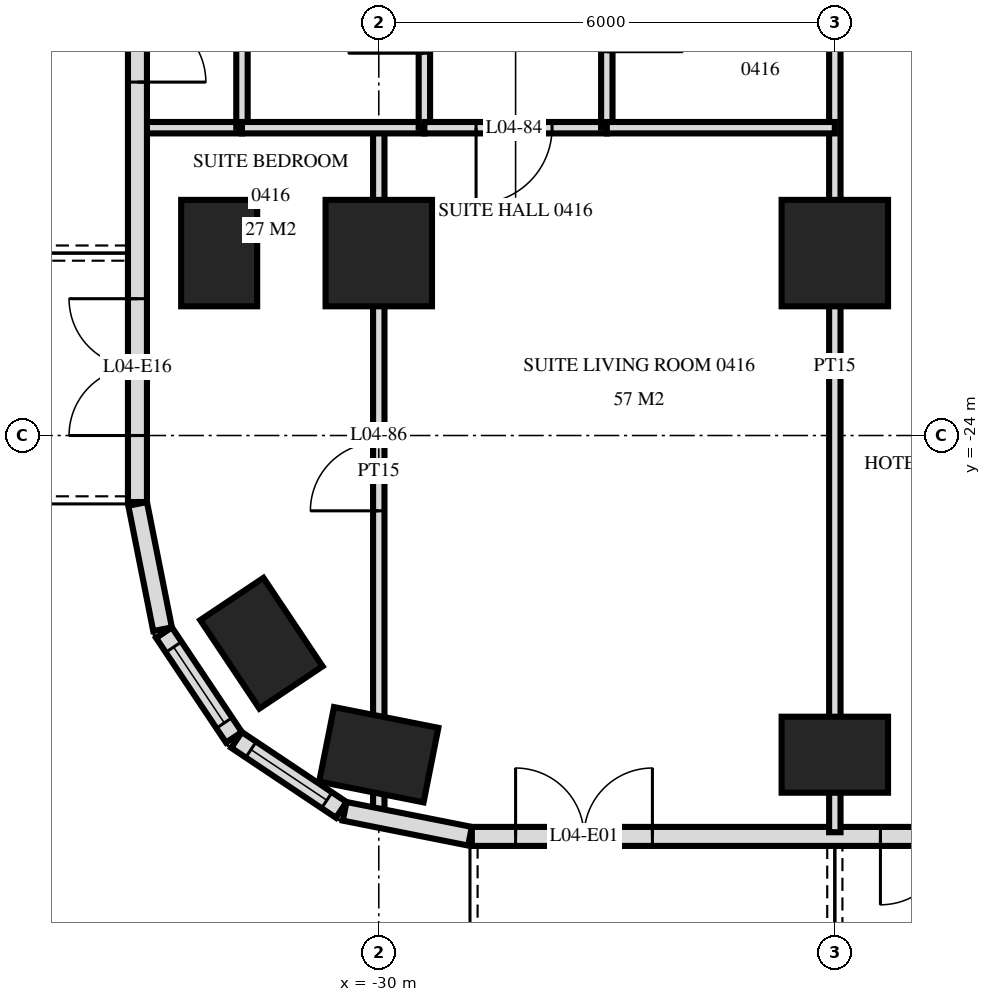
"""IFC4 building model, lengths in metres.
Left out: names, types, materials, properties, quantities, classifications, styles, units other than length and angle.
Written with IfcOpenShell. Run it as: python <this file> out.ifc"""

import sys

from ifc_helpers import new_model, si_unit, direction, frame, frame_2d, origin, origin_2d, place, context, subcontext, project, spatial, rectangle, extrude, element, fill, save


model = new_model("IFC4")
c1 = context("Model", 3, precision=1e-05, world=origin(), true_north=direction((0.0, 1.0)))
c2 = subcontext(c1, "Body", "Model", "MODEL_VIEW")
j1 = project(units=[si_unit("LENGTHUNIT", "METRE"), si_unit("PLANEANGLEUNIT", "RADIAN")], contexts=[c1])
p1 = place(None, origin())
s1 = spatial("IfcSite", under=j1, at=p1, CompositionType="ELEMENT")
p2 = place(p1, origin())
s2 = spatial("IfcBuilding", under=s1, at=p2, CompositionType="ELEMENT")
p3 = place(p2, frame((0.0, 0.0, 24.0)))
s3 = spatial("IfcBuildingStorey", under=s2, at=p3, CompositionType="ELEMENT", Elevation=24.0)
for number, where, z_axis, x_axis in (
    (1, (-32.1, -21.6, -0.28), (0.0, 0.0, 1.0), (0.0, 1.0, 0.0)),
    (2, (-31.544, -26.733, -0.28), (0.0, 0.0, 1.0), (-0.556, 0.831, 0.0)),
    (3, (-30.0, -28.2, -0.28), (0.0, 0.0, 1.0), (-0.981, 0.195, 0.0)),
):
    element("IfcColumn", number, at=place(p3, frame(where, z_axis=z_axis, x_axis=x_axis)), inside=s3, PredefinedType="COLUMN", context=c2, shape_type="SweptSolid", body=[
        extrude(rectangle(XDim=1.4, YDim=1.0, at=origin_2d()), origin(), (0.0, 0.0, 1.0), 3.88),
    ])
p4 = place(p3, frame((-30.0, -21.6, -0.28), z_axis=(0.0, 0.0, 1.0), x_axis=(1.0, 0.0, 0.0)))
e4 = element("IfcColumn", 4, at=p4, inside=s3, PredefinedType="COLUMN", context=c2, shape_type="SweptSolid", body=[
    extrude(rectangle(XDim=1.4, YDim=1.4, at=origin_2d()), origin(), (0.0, 0.0, 1.0), 3.88),
])
p5 = place(p3, frame((-24.0, -28.2, -0.28), z_axis=(0.0, 0.0, 1.0), x_axis=(1.0, 0.0, 0.0)))
e5 = element("IfcColumn", 5, at=p5, inside=s3, PredefinedType="COLUMN", context=c2, shape_type="SweptSolid", body=[
    extrude(rectangle(XDim=1.4, YDim=1.0, at=origin_2d()), origin(), (0.0, 0.0, 1.0), 3.88),
])
p6 = place(p3, frame((-24.0, -21.6, -0.28), z_axis=(0.0, 0.0, 1.0), x_axis=(1.0, 0.0, 0.0)))
e6 = element("IfcColumn", 6, at=p6, inside=s3, PredefinedType="COLUMN", context=c2, shape_type="SweptSolid", body=[
    extrude(rectangle(XDim=1.4, YDim=1.4, at=origin_2d()), origin(), (0.0, 0.0, 1.0), 3.88),
])
p7 = place(p3, frame((-33.175, -3.325, 0.0), z_axis=(0.0, 0.0, 1.0), x_axis=(0.0, -1.0, 0.0)))
e7 = element("IfcWall", 7, at=p7, inside=s3, PredefinedType="SOLIDWALL", context=c2, shape_type="SweptSolid", body=[
    extrude(rectangle(XDim=21.551, YDim=0.25, at=frame_2d((10.775, 0.0))), origin(), (0.0, 0.0, 1.0), 3.32),
])
p8 = place(p7, frame((7.025, 0.0, 0.0)))
e8 = element("IfcOpeningElement", 8, at=p8, cuts=e7, PredefinedType="OPENING", context=c2, shape_type="SweptSolid", body=[
    extrude(rectangle(XDim=1.8, YDim=2.4, at=frame_2d((0.9, 1.2))), frame((0.0, 0.135, 0.0), z_axis=(0.0, -1.0, 0.0), x_axis=(1.0, 0.0, 0.0)), (0.0, 0.0, 1.0), 0.27),
])
p9 = place(p7, frame((14.225, 0.0, 0.0)))
e9 = element("IfcOpeningElement", 9, at=p9, cuts=e7, PredefinedType="OPENING", context=c2, shape_type="SweptSolid", body=[
    extrude(rectangle(XDim=1.8, YDim=2.4, at=frame_2d((0.9, 1.2))), frame((0.0, 0.135, 0.0), z_axis=(0.0, -1.0, 0.0), x_axis=(1.0, 0.0, 0.0)), (0.0, 0.0, 1.0), 0.27),
])
p10 = place(p7, frame((18.875, 0.0, 0.0)))
e10 = element("IfcOpeningElement", 10, at=p10, cuts=e7, PredefinedType="OPENING", context=c2, shape_type="SweptSolid", body=[
    extrude(rectangle(XDim=1.8, YDim=2.4, at=frame_2d((0.9, 1.2))), frame((0.0, 0.135, 0.0), z_axis=(0.0, -1.0, 0.0), x_axis=(1.0, 0.0, 0.0)), (0.0, 0.0, 1.0), 0.27),
])
p11 = place(p3, frame((-33.173, -24.9, 0.0), z_axis=(0.0, 0.0, 1.0), x_axis=(0.195166572128, -0.980770110232, 0.0)))
e11 = element("IfcWall", 11, at=p11, inside=s3, PredefinedType="SOLIDWALL", context=c2, shape_type="SweptSolid", body=[
    extrude(rectangle(XDim=1.681, YDim=0.25, at=frame_2d((0.841, 0.0))), origin(), (0.0, 0.0, 1.0), 3.32),
])
p12 = place(p3, frame((-32.826, -26.594, 0.0), z_axis=(0.0, 0.0, 1.0), x_axis=(0.55555029066, -0.831482937015, 0.0)))
e12 = element("IfcWall", 12, at=p12, inside=s3, PredefinedType="SOLIDWALL", context=c2, shape_type="SweptSolid", body=[
    extrude(rectangle(XDim=1.656, YDim=0.25, at=frame_2d((0.828, 0.0))), origin(), (0.0, 0.0, 1.0), 3.32),
])
p13 = place(p12, frame((0.228, 0.0, 0.9)))
e13 = element("IfcOpeningElement", 13, at=p13, cuts=e12, PredefinedType="OPENING", context=c2, shape_type="SweptSolid", body=[
    extrude(rectangle(XDim=1.2, YDim=1.5, at=frame_2d((0.6, 0.75))), frame((0.0, 0.135, 0.0), z_axis=(0.0, -1.0, 0.0), x_axis=(1.0, 0.0, 0.0)), (0.0, 0.0, 1.0), 0.27),
])
p14 = place(p3, frame((-31.871, -28.006, 0.0), z_axis=(0.0, 0.0, 1.0), x_axis=(0.831482937015, -0.55555029066, 0.0)))
e14 = element("IfcWall", 14, at=p14, inside=s3, PredefinedType="SOLIDWALL", context=c2, shape_type="SweptSolid", body=[
    extrude(rectangle(XDim=1.656, YDim=0.25, at=frame_2d((0.828, 0.0))), origin(), (0.0, 0.0, 1.0), 3.32),
])
p15 = place(p14, frame((0.228, 0.0, 0.9)))
e15 = element("IfcOpeningElement", 15, at=p15, cuts=e14, PredefinedType="OPENING", context=c2, shape_type="SweptSolid", body=[
    extrude(rectangle(XDim=1.2, YDim=1.5, at=frame_2d((0.6, 0.75))), frame((0.0, 0.135, 0.0), z_axis=(0.0, -1.0, 0.0), x_axis=(1.0, 0.0, 0.0)), (0.0, 0.0, 1.0), 0.27),
])
p16 = place(p3, frame((-30.449, -28.945, 0.0), z_axis=(0.0, 0.0, 1.0), x_axis=(0.980775640221, -0.19513878023, 0.0)))
e16 = element("IfcWall", 16, at=p16, inside=s3, PredefinedType="SOLIDWALL", context=c2, shape_type="SweptSolid", body=[
    extrude(rectangle(XDim=1.681, YDim=0.25, at=frame_2d((0.841, 0.0))), origin(), (0.0, 0.0, 1.0), 3.32),
])
p17 = place(p3, frame((-28.775, -29.275, 0.0), z_axis=(0.0, 0.0, 1.0), x_axis=(1.0, 0.0, 0.0)))
e17 = element("IfcWall", 17, at=p17, inside=s3, PredefinedType="SOLIDWALL", context=c2, shape_type="SweptSolid", body=[
    extrude(rectangle(XDim=57.551, YDim=0.25, at=frame_2d((28.775, 0.0))), origin(), (0.0, 0.0, 1.0), 3.32),
])
p18 = place(p17, frame((0.575, 0.0, 0.0)))
e18 = element("IfcOpeningElement", 18, at=p18, cuts=e17, PredefinedType="OPENING", context=c2, shape_type="SweptSolid", body=[
    extrude(rectangle(XDim=1.8, YDim=2.4, at=frame_2d((0.9, 1.2))), frame((0.0, 0.135, 0.0), z_axis=(0.0, -1.0, 0.0), x_axis=(1.0, 0.0, 0.0)), (0.0, 0.0, 1.0), 0.27),
])
p19 = place(p17, frame((5.375, 0.0, 0.0)))
e19 = element("IfcOpeningElement", 19, at=p19, cuts=e17, PredefinedType="OPENING", context=c2, shape_type="SweptSolid", body=[
    extrude(rectangle(XDim=1.8, YDim=2.4, at=frame_2d((0.9, 1.2))), frame((0.0, 0.135, 0.0), z_axis=(0.0, -1.0, 0.0), x_axis=(1.0, 0.0, 0.0)), (0.0, 0.0, 1.0), 0.27),
])
p20 = place(p17, frame((8.075, 0.0, 0.3)))
e20 = element("IfcOpeningElement", 20, at=p20, cuts=e17, PredefinedType="OPENING", context=c2, shape_type="SweptSolid", body=[
    extrude(rectangle(XDim=2.4, YDim=2.1, at=frame_2d((1.2, 1.05))), frame((0.0, 0.135, 0.0), z_axis=(0.0, -1.0, 0.0), x_axis=(1.0, 0.0, 0.0)), (0.0, 0.0, 1.0), 0.27),
])
p21 = place(p17, frame((11.375, 0.0, 0.0)))
e21 = element("IfcOpeningElement", 21, at=p21, cuts=e17, PredefinedType="OPENING", context=c2, shape_type="SweptSolid", body=[
    extrude(rectangle(XDim=1.8, YDim=2.4, at=frame_2d((0.9, 1.2))), frame((0.0, 0.135, 0.0), z_axis=(0.0, -1.0, 0.0), x_axis=(1.0, 0.0, 0.0)), (0.0, 0.0, 1.0), 0.27),
])
p22 = place(p17, frame((14.075, 0.0, 0.3)))
e22 = element("IfcOpeningElement", 22, at=p22, cuts=e17, PredefinedType="OPENING", context=c2, shape_type="SweptSolid", body=[
    extrude(rectangle(XDim=2.4, YDim=2.1, at=frame_2d((1.2, 1.05))), frame((0.0, 0.135, 0.0), z_axis=(0.0, -1.0, 0.0), x_axis=(1.0, 0.0, 0.0)), (0.0, 0.0, 1.0), 0.27),
])
p23 = place(p17, frame((17.375, 0.0, 0.0)))
e23 = element("IfcOpeningElement", 23, at=p23, cuts=e17, PredefinedType="OPENING", context=c2, shape_type="SweptSolid", body=[
    extrude(rectangle(XDim=1.8, YDim=2.4, at=frame_2d((0.9, 1.2))), frame((0.0, 0.135, 0.0), z_axis=(0.0, -1.0, 0.0), x_axis=(1.0, 0.0, 0.0)), (0.0, 0.0, 1.0), 0.27),
])
p24 = place(p17, frame((20.075, 0.0, 0.3)))
e24 = element("IfcOpeningElement", 24, at=p24, cuts=e17, PredefinedType="OPENING", context=c2, shape_type="SweptSolid", body=[
    extrude(rectangle(XDim=2.4, YDim=2.1, at=frame_2d((1.2, 1.05))), frame((0.0, 0.135, 0.0), z_axis=(0.0, -1.0, 0.0), x_axis=(1.0, 0.0, 0.0)), (0.0, 0.0, 1.0), 0.27),
])
p25 = place(p17, frame((23.075, 0.0, 0.3)))
e25 = element("IfcOpeningElement", 25, at=p25, cuts=e17, PredefinedType="OPENING", context=c2, shape_type="SweptSolid", body=[
    extrude(rectangle(XDim=2.4, YDim=2.1, at=frame_2d((1.2, 1.05))), frame((0.0, 0.135, 0.0), z_axis=(0.0, -1.0, 0.0), x_axis=(1.0, 0.0, 0.0)), (0.0, 0.0, 1.0), 0.27),
])
p26 = place(p17, frame((26.375, 0.0, 0.0)))
e26 = element("IfcOpeningElement", 26, at=p26, cuts=e17, PredefinedType="OPENING", context=c2, shape_type="SweptSolid", body=[
    extrude(rectangle(XDim=1.8, YDim=2.4, at=frame_2d((0.9, 1.2))), frame((0.0, 0.135, 0.0), z_axis=(0.0, -1.0, 0.0), x_axis=(1.0, 0.0, 0.0)), (0.0, 0.0, 1.0), 0.27),
])
p27 = place(p17, frame((29.375, 0.0, 0.0)))
e27 = element("IfcOpeningElement", 27, at=p27, cuts=e17, PredefinedType="OPENING", context=c2, shape_type="SweptSolid", body=[
    extrude(rectangle(XDim=1.8, YDim=2.4, at=frame_2d((0.9, 1.2))), frame((0.0, 0.135, 0.0), z_axis=(0.0, -1.0, 0.0), x_axis=(1.0, 0.0, 0.0)), (0.0, 0.0, 1.0), 0.27),
])
p28 = place(p17, frame((32.075, 0.0, 0.3)))
e28 = element("IfcOpeningElement", 28, at=p28, cuts=e17, PredefinedType="OPENING", context=c2, shape_type="SweptSolid", body=[
    extrude(rectangle(XDim=2.4, YDim=2.1, at=frame_2d((1.2, 1.05))), frame((0.0, 0.135, 0.0), z_axis=(0.0, -1.0, 0.0), x_axis=(1.0, 0.0, 0.0)), (0.0, 0.0, 1.0), 0.27),
])
p29 = place(p17, frame((35.375, 0.0, 0.0)))
e29 = element("IfcOpeningElement", 29, at=p29, cuts=e17, PredefinedType="OPENING", context=c2, shape_type="SweptSolid", body=[
    extrude(rectangle(XDim=1.8, YDim=2.4, at=frame_2d((0.9, 1.2))), frame((0.0, 0.135, 0.0), z_axis=(0.0, -1.0, 0.0), x_axis=(1.0, 0.0, 0.0)), (0.0, 0.0, 1.0), 0.27),
])
p30 = place(p17, frame((38.075, 0.0, 0.3)))
e30 = element("IfcOpeningElement", 30, at=p30, cuts=e17, PredefinedType="OPENING", context=c2, shape_type="SweptSolid", body=[
    extrude(rectangle(XDim=2.4, YDim=2.1, at=frame_2d((1.2, 1.05))), frame((0.0, 0.135, 0.0), z_axis=(0.0, -1.0, 0.0), x_axis=(1.0, 0.0, 0.0)), (0.0, 0.0, 1.0), 0.27),
])
p31 = place(p17, frame((41.375, 0.0, 0.0)))
e31 = element("IfcOpeningElement", 31, at=p31, cuts=e17, PredefinedType="OPENING", context=c2, shape_type="SweptSolid", body=[
    extrude(rectangle(XDim=1.8, YDim=2.4, at=frame_2d((0.9, 1.2))), frame((0.0, 0.135, 0.0), z_axis=(0.0, -1.0, 0.0), x_axis=(1.0, 0.0, 0.0)), (0.0, 0.0, 1.0), 0.27),
])
p32 = place(p17, frame((44.075, 0.0, 0.3)))
e32 = element("IfcOpeningElement", 32, at=p32, cuts=e17, PredefinedType="OPENING", context=c2, shape_type="SweptSolid", body=[
    extrude(rectangle(XDim=2.4, YDim=2.1, at=frame_2d((1.2, 1.05))), frame((0.0, 0.135, 0.0), z_axis=(0.0, -1.0, 0.0), x_axis=(1.0, 0.0, 0.0)), (0.0, 0.0, 1.0), 0.27),
])
p33 = place(p17, frame((47.075, 0.0, 0.3)))
e33 = element("IfcOpeningElement", 33, at=p33, cuts=e17, PredefinedType="OPENING", context=c2, shape_type="SweptSolid", body=[
    extrude(rectangle(XDim=2.4, YDim=2.1, at=frame_2d((1.2, 1.05))), frame((0.0, 0.135, 0.0), z_axis=(0.0, -1.0, 0.0), x_axis=(1.0, 0.0, 0.0)), (0.0, 0.0, 1.0), 0.27),
])
p34 = place(p17, frame((50.375, 0.0, 0.0)))
e34 = element("IfcOpeningElement", 34, at=p34, cuts=e17, PredefinedType="OPENING", context=c2, shape_type="SweptSolid", body=[
    extrude(rectangle(XDim=1.8, YDim=2.4, at=frame_2d((0.9, 1.2))), frame((0.0, 0.135, 0.0), z_axis=(0.0, -1.0, 0.0), x_axis=(1.0, 0.0, 0.0)), (0.0, 0.0, 1.0), 0.27),
])
p35 = place(p17, frame((53.375, 0.0, 0.0)))
e35 = element("IfcOpeningElement", 35, at=p35, cuts=e17, PredefinedType="OPENING", context=c2, shape_type="SweptSolid", body=[
    extrude(rectangle(XDim=1.8, YDim=2.4, at=frame_2d((0.9, 1.2))), frame((0.0, 0.135, 0.0), z_axis=(0.0, -1.0, 0.0), x_axis=(1.0, 0.0, 0.0)), (0.0, 0.0, 1.0), 0.27),
])
p36 = place(p3, frame((-24.0, -29.22, 0.0), z_axis=(0.0, 0.0, 1.0), x_axis=(0.0, 1.0, 0.0)))
e36 = element("IfcWall", 36, at=p36, inside=s3, PredefinedType="PARTITIONING", context=c2, shape_type="SweptSolid", body=[
    extrude(rectangle(XDim=12.27, YDim=0.15, at=frame_2d((6.135, 0.0))), origin(), (0.0, 0.0, 1.0), 3.32),
])
p37 = place(p3, frame((-27.0, -19.95, 0.0), z_axis=(0.0, 0.0, 1.0), x_axis=(0.0, 1.0, 0.0)))
e37 = element("IfcWall", 37, at=p37, inside=s3, PredefinedType="PARTITIONING", context=c2, shape_type="SweptSolid", body=[
    extrude(rectangle(XDim=3.0, YDim=0.15, at=frame_2d((1.5, 0.0))), origin(), (0.0, 0.0, 1.0), 3.32),
])
p38 = place(p37, frame((1.0, 0.0, 0.0)))
e38 = element("IfcOpeningElement", 38, at=p38, cuts=e37, PredefinedType="OPENING", context=c2, shape_type="SweptSolid", body=[
    extrude(rectangle(XDim=1.0, YDim=2.1, at=frame_2d((0.5, 1.05))), frame((0.0, 0.085, 0.0), z_axis=(0.0, -1.0, 0.0), x_axis=(1.0, 0.0, 0.0)), (0.0, 0.0, 1.0), 0.17),
])
p39 = place(p3, frame((-29.4, -19.95, 0.0), z_axis=(0.0, 0.0, 1.0), x_axis=(0.0, 1.0, 0.0)))
e39 = element("IfcWall", 39, at=p39, inside=s3, PredefinedType="PARTITIONING", context=c2, shape_type="SweptSolid", body=[
    extrude(rectangle(XDim=3.0, YDim=0.15, at=frame_2d((1.5, 0.0))), origin(), (0.0, 0.0, 1.0), 3.32),
])
p40 = place(p39, frame((0.98, 0.0, 0.0)))
e40 = element("IfcOpeningElement", 40, at=p40, cuts=e39, PredefinedType="OPENING", context=c2, shape_type="SweptSolid", body=[
    extrude(rectangle(XDim=1.0, YDim=2.1, at=frame_2d((0.5, 1.05))), frame((0.0, 0.085, 0.0), z_axis=(0.0, -1.0, 0.0), x_axis=(1.0, 0.0, 0.0)), (0.0, 0.0, 1.0), 0.17),
])
p41 = place(p3, frame((-30.0, -28.978, 0.0), z_axis=(0.0, 0.0, 1.0), x_axis=(0.0, 1.0, 0.0)))
e41 = element("IfcWall", 41, at=p41, inside=s3, PredefinedType="PARTITIONING", context=c2, shape_type="SweptSolid", body=[
    extrude(rectangle(XDim=9.028, YDim=0.15, at=frame_2d((4.514, 0.0))), origin(), (0.0, 0.0, 1.0), 3.32),
])
p42 = place(p41, frame((3.987, 0.0, 0.0)))
e42 = element("IfcOpeningElement", 42, at=p42, cuts=e41, PredefinedType="OPENING", context=c2, shape_type="SweptSolid", body=[
    extrude(rectangle(XDim=0.9, YDim=2.1, at=frame_2d((0.45, 1.05))), frame((0.0, 0.085, 0.0), z_axis=(0.0, -1.0, 0.0), x_axis=(1.0, 0.0, 0.0)), (0.0, 0.0, 1.0), 0.17),
])
p43 = place(p3, frame((-31.8, -19.95, 0.0), z_axis=(0.0, 0.0, 1.0), x_axis=(0.0, 1.0, 0.0)))
e43 = element("IfcWall", 43, at=p43, inside=s3, PredefinedType="PLUMBINGWALL", context=c2, shape_type="SweptSolid", body=[
    extrude(rectangle(XDim=3.0, YDim=0.15, at=frame_2d((1.5, 0.0))), origin(), (0.0, 0.0, 1.0), 3.32),
])
p44 = place(p43, frame((1.08, 0.0, 0.0)))
e44 = element("IfcOpeningElement", 44, at=p44, cuts=e43, PredefinedType="OPENING", context=c2, shape_type="SweptSolid", body=[
    extrude(rectangle(XDim=0.8, YDim=2.1, at=frame_2d((0.4, 1.05))), frame((0.0, 0.085, 0.0), z_axis=(0.0, -1.0, 0.0), x_axis=(1.0, 0.0, 0.0)), (0.0, 0.0, 1.0), 0.17),
])
p45 = place(p3, frame((-29.4, -19.95, 0.0), z_axis=(0.0, 0.0, 1.0), x_axis=(1.0, 0.0, 0.0)))
e45 = element("IfcWall", 45, at=p45, inside=s3, PredefinedType="PARTITIONING", context=c2, shape_type="SweptSolid", body=[
    extrude(rectangle(XDim=2.4, YDim=0.15, at=frame_2d((1.2, 0.0))), origin(), (0.0, 0.0, 1.0), 3.32),
])
p46 = place(p45, frame((0.68, 0.0, 0.0)))
e46 = element("IfcOpeningElement", 46, at=p46, cuts=e45, PredefinedType="OPENING", context=c2, shape_type="SweptSolid", body=[
    extrude(rectangle(XDim=1.0, YDim=2.1, at=frame_2d((0.5, 1.05))), frame((0.0, 0.085, 0.0), z_axis=(0.0, -1.0, 0.0), x_axis=(1.0, 0.0, 0.0)), (0.0, 0.0, 1.0), 0.17),
])
p47 = place(p3, frame((-31.8, -19.95, 0.0), z_axis=(0.0, 0.0, 1.0), x_axis=(1.0, 0.0, 0.0)))
e47 = element("IfcWall", 47, at=p47, inside=s3, PredefinedType="PARTITIONING", context=c2, shape_type="SweptSolid", body=[
    extrude(rectangle(XDim=2.4, YDim=0.15, at=frame_2d((1.2, 0.0))), origin(), (0.0, 0.0, 1.0), 3.32),
])
p48 = place(p3, frame((-27.0, -19.95, 0.0), z_axis=(0.0, 0.0, 1.0), x_axis=(1.0, 0.0, 0.0)))
e48 = element("IfcWall", 48, at=p48, inside=s3, PredefinedType="PARTITIONING", context=c2, shape_type="SweptSolid", body=[
    extrude(rectangle(XDim=3.0, YDim=0.15, at=frame_2d((1.5, 0.0))), origin(), (0.0, 0.0, 1.0), 3.32),
])
p49 = place(p3, frame((-33.12, -19.95, 0.0), z_axis=(0.0, 0.0, 1.0), x_axis=(1.0, 0.0, 0.0)))
e49 = element("IfcWall", 49, at=p49, inside=s3, PredefinedType="PLUMBINGWALL", context=c2, shape_type="SweptSolid", body=[
    extrude(rectangle(XDim=1.32, YDim=0.15, at=frame_2d((0.66, 0.0))), origin(), (0.0, 0.0, 1.0), 3.32),
])
p50 = place(p13, origin())
e50 = element("IfcWindow", 50, at=p50, inside=s3, PartitioningType="SINGLE_PANEL", PredefinedType="WINDOW", context=c2, shape_type="SweptSolid", body=[
    extrude(rectangle(XDim=1.2, YDim=1.5, at=frame_2d((0.6, 0.75))), frame((0.0, 0.03, 0.0), z_axis=(0.0, -1.0, 0.0), x_axis=(1.0, 0.0, 0.0)), (0.0, 0.0, 1.0), 0.06),
])
fill(e13, e50)
p51 = place(p15, origin())
e51 = element("IfcWindow", 51, at=p51, inside=s3, PartitioningType="SINGLE_PANEL", PredefinedType="WINDOW", context=c2, shape_type="SweptSolid", body=[
    extrude(rectangle(XDim=1.2, YDim=1.5, at=frame_2d((0.6, 0.75))), frame((0.0, 0.03, 0.0), z_axis=(0.0, -1.0, 0.0), x_axis=(1.0, 0.0, 0.0)), (0.0, 0.0, 1.0), 0.06),
])
fill(e15, e51)
p52 = place(p18, origin())
e52 = element("IfcDoor", 52, at=p52, inside=s3, OperationType="DOUBLE_DOOR_SINGLE_SWING", PredefinedType="DOOR", context=c2, shape_type="SweptSolid", body=[
    extrude(rectangle(XDim=1.8, YDim=2.4, at=frame_2d((0.9, 1.2))), frame((0.0, 0.025, 0.0), z_axis=(0.0, -1.0, 0.0), x_axis=(1.0, 0.0, 0.0)), (0.0, 0.0, 1.0), 0.05),
])
fill(e18, e52)
p53 = place(p19, frame((0.9, 0.0, 0.0), z_axis=(0.0, 0.0, 1.0), x_axis=(-1.0, 0.0, 0.0)))
e53 = element("IfcDoor", 53, at=p53, inside=s3, OperationType="DOUBLE_DOOR_SINGLE_SWING", PredefinedType="DOOR", context=c2, shape_type="SweptSolid", body=[
    extrude(rectangle(XDim=1.8, YDim=2.4, at=frame_2d((0.0, 1.2))), frame((0.0, -0.025, 0.0), z_axis=(0.0, 1.0, 0.0), x_axis=(-1.0, 0.0, 0.0)), (0.0, 0.0, 1.0), 0.05),
])
fill(e19, e53)
p54 = place(p9, origin())
e54 = element("IfcDoor", 54, at=p54, inside=s3, OperationType="DOUBLE_DOOR_SINGLE_SWING", PredefinedType="DOOR", context=c2, shape_type="SweptSolid", body=[
    extrude(rectangle(XDim=1.8, YDim=2.4, at=frame_2d((0.9, 1.2))), frame((0.0, 0.025, 0.0), z_axis=(0.0, -1.0, 0.0), x_axis=(1.0, 0.0, 0.0)), (0.0, 0.0, 1.0), 0.05),
])
fill(e9, e54)
p55 = place(p10, frame((0.9, 0.0, 0.0), z_axis=(0.0, 0.0, 1.0), x_axis=(-1.0, 0.0, 0.0)))
e55 = element("IfcDoor", 55, at=p55, inside=s3, OperationType="DOUBLE_DOOR_SINGLE_SWING", PredefinedType="DOOR", context=c2, shape_type="SweptSolid", body=[
    extrude(rectangle(XDim=1.8, YDim=2.4, at=frame_2d((0.0, 1.2))), frame((0.0, -0.025, 0.0), z_axis=(0.0, 1.0, 0.0), x_axis=(-1.0, 0.0, 0.0)), (0.0, 0.0, 1.0), 0.05),
])
fill(e10, e55)
p56 = place(p40, origin())
e56 = element("IfcDoor", 56, at=p56, inside=s3, OperationType="SINGLE_SWING_RIGHT", PredefinedType="DOOR", context=c2, shape_type="SweptSolid", body=[
    extrude(rectangle(XDim=1.0, YDim=2.1, at=frame_2d((0.5, 1.05))), frame((0.0, 0.025, 0.0), z_axis=(0.0, -1.0, 0.0), x_axis=(1.0, 0.0, 0.0)), (0.0, 0.0, 1.0), 0.05),
])
fill(e40, e56)
p57 = place(p46, frame((0.5, 0.0, 0.0), z_axis=(0.0, 0.0, 1.0), x_axis=(-1.0, 0.0, 0.0)))
e57 = element("IfcDoor", 57, at=p57, inside=s3, OperationType="SINGLE_SWING_LEFT", PredefinedType="DOOR", context=c2, shape_type="SweptSolid", body=[
    extrude(rectangle(XDim=1.0, YDim=2.1, at=frame_2d((0.0, 1.05))), frame((0.0, -0.025, 0.0), z_axis=(0.0, 1.0, 0.0), x_axis=(-1.0, 0.0, 0.0)), (0.0, 0.0, 1.0), 0.05),
])
fill(e46, e57)
p58 = place(p42, origin())
e58 = element("IfcDoor", 58, at=p58, inside=s3, OperationType="SINGLE_SWING_RIGHT", PredefinedType="DOOR", context=c2, shape_type="SweptSolid", body=[
    extrude(rectangle(XDim=0.9, YDim=2.1, at=frame_2d((0.45, 1.05))), frame((0.0, 0.025, 0.0), z_axis=(0.0, -1.0, 0.0), x_axis=(1.0, 0.0, 0.0)), (0.0, 0.0, 1.0), 0.05),
])
fill(e42, e58)
save(model, sys.argv[1])
